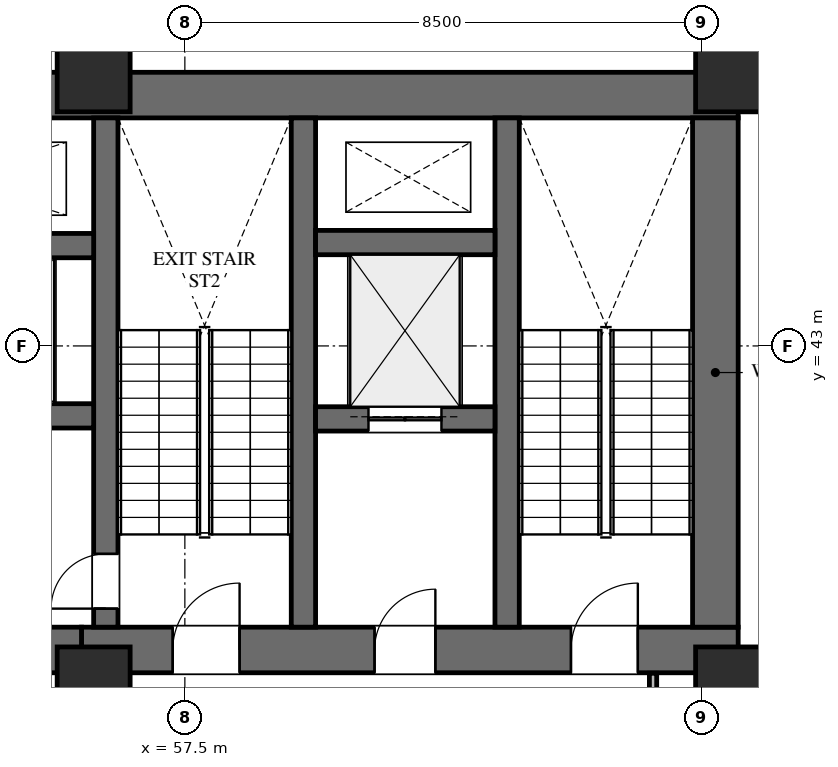
"""IFC4 building model, lengths in metres.
Left out: names, types, materials, properties, quantities, classifications, styles, units other than length and angle.
Written with IfcOpenShell. Run it as: python <this file> out.ifc"""

import sys

from ifc_helpers import new_model, si_unit, direction, frame, frame_2d, origin, origin_2d, place, context, subcontext, project, spatial, rectangle, extrude, element, fill, save


model = new_model("IFC4")
c1 = context("Model", 3, precision=1e-05, world=origin(), true_north=direction((0.0, 1.0)))
c2 = subcontext(c1, "Body", "Model", "MODEL_VIEW")
j1 = project(units=[si_unit("LENGTHUNIT", "METRE"), si_unit("PLANEANGLEUNIT", "RADIAN")], contexts=[c1])
p1 = place(None, origin())
s1 = spatial("IfcSite", under=j1, at=p1, CompositionType="ELEMENT")
p2 = place(p1, origin())
s2 = spatial("IfcBuilding", under=s1, at=p2, CompositionType="ELEMENT")
p3 = place(p2, frame((0.0, 0.0, 91.5)))
s3 = spatial("IfcBuildingStorey", under=s2, at=p3, CompositionType="ELEMENT", Elevation=91.5)
p4 = place(p3, frame((22.9, 47.125, 0.0), z_axis=(0.0, 0.0, 1.0), x_axis=(1.0, 0.0, 0.0)))
e1 = element("IfcWall", 1, at=p4, inside=s3, PredefinedType="SHEAR", context=c2, shape_type="SweptSolid", body=[
    extrude(rectangle(XDim=43.7, YDim=0.75, at=frame_2d((21.85, 0.0))), origin(), (0.0, 0.0, 1.0), 4.5),
])
p5 = place(p3, frame((55.8, 38.0, 0.0), z_axis=(0.0, 0.0, 1.0), x_axis=(1.0, 0.0, 0.0)))
e2 = element("IfcWall", 2, at=p5, inside=s3, PredefinedType="SHEAR", context=c2, shape_type="SweptSolid", body=[
    extrude(rectangle(XDim=10.8, YDim=0.75, at=frame_2d((5.4, 0.0))), origin(), (0.0, 0.0, 1.0), 4.5),
])
p6 = place(p5, frame((1.5, 0.0, 0.0)))
e3 = element("IfcOpeningElement", 3, at=p6, cuts=e2, PredefinedType="OPENING", context=c2, shape_type="SweptSolid", body=[
    extrude(rectangle(XDim=1.1, YDim=2.2, at=frame_2d((0.55, 1.1))), frame((0.0, 0.385, 0.0), z_axis=(0.0, -1.0, 0.0), x_axis=(1.0, 0.0, 0.0)), (0.0, 0.0, 1.0), 0.77),
])
p7 = place(p5, frame((4.82, 0.0, 0.0)))
e4 = element("IfcOpeningElement", 4, at=p7, cuts=e2, PredefinedType="OPENING", context=c2, shape_type="SweptSolid", body=[
    extrude(rectangle(XDim=1.0, YDim=2.15, at=frame_2d((0.5, 1.075))), frame((0.0, 0.385, 0.0), z_axis=(0.0, -1.0, 0.0), x_axis=(1.0, 0.0, 0.0)), (0.0, 0.0, 1.0), 0.77),
])
p8 = place(p5, frame((8.05, 0.0, 0.0)))
e5 = element("IfcOpeningElement", 5, at=p8, cuts=e2, PredefinedType="OPENING", context=c2, shape_type="SweptSolid", body=[
    extrude(rectangle(XDim=1.1, YDim=2.2, at=frame_2d((0.55, 1.1))), frame((0.0, 0.385, 0.0), z_axis=(0.0, -1.0, 0.0), x_axis=(1.0, 0.0, 0.0)), (0.0, 0.0, 1.0), 0.77),
])
p9 = place(p3, frame((66.225, 38.375, 0.0), z_axis=(0.0, 0.0, 1.0), x_axis=(0.0, 1.0, 0.0)))
e6 = element("IfcWall", 6, at=p9, inside=s3, PredefinedType="SHEAR", context=c2, shape_type="SweptSolid", body=[
    extrude(rectangle(XDim=8.375, YDim=0.75, at=frame_2d((4.188, 0.0))), origin(), (0.0, 0.0, 1.0), 4.5),
])
for number, where, z_axis, x_axis in (
    (7, (62.8, 38.375, 0.0), (0.0, 0.0, 1.0), (0.0, 1.0, 0.0)),
    (8, (59.45, 38.375, 0.0), (0.0, 0.0, 1.0), (0.0, 1.0, 0.0)),
):
    element("IfcWall", number, at=place(p3, frame(where, z_axis=z_axis, x_axis=x_axis)), inside=s3, PredefinedType="SHEAR", context=c2, shape_type="SweptSolid", body=[
        extrude(rectangle(XDim=8.375, YDim=0.4, at=frame_2d((4.188, 0.0))), origin(), (0.0, 0.0, 1.0), 4.5),
    ])
p10 = place(p3, frame((56.2, 38.375, 0.0), z_axis=(0.0, 0.0, 1.0), x_axis=(0.0, 1.0, 0.0)))
e9 = element("IfcWall", 9, at=p10, inside=s3, PredefinedType="SHEAR", context=c2, shape_type="SweptSolid", body=[
    extrude(rectangle(XDim=8.375, YDim=0.4, at=frame_2d((4.188, 0.0))), origin(), (0.0, 0.0, 1.0), 4.5),
])
p11 = place(p10, frame((0.305, 0.0, 0.0)))
e10 = element("IfcOpeningElement", 10, at=p11, cuts=e9, PredefinedType="OPENING", context=c2, shape_type="SweptSolid", body=[
    extrude(rectangle(XDim=0.9, YDim=2.15, at=frame_2d((0.45, 1.075))), frame((0.0, 0.21, 0.0), z_axis=(0.0, -1.0, 0.0), x_axis=(1.0, 0.0, 0.0)), (0.0, 0.0, 1.0), 0.42),
])
p12 = place(p3, frame((59.65, 41.8, 0.0), z_axis=(0.0, 0.0, 1.0), x_axis=(1.0, 0.0, 0.0)))
e11 = element("IfcWall", 11, at=p12, inside=s3, PredefinedType="SHEAR", context=c2, shape_type="SweptSolid", body=[
    extrude(rectangle(XDim=2.95, YDim=0.4, at=frame_2d((1.475, 0.0))), origin(), (0.0, 0.0, 1.0), 4.5),
])
p13 = place(p12, frame((0.87, 0.0, 0.0)))
e12 = element("IfcOpeningElement", 12, at=p13, cuts=e11, PredefinedType="OPENING", context=c2, shape_type="SweptSolid", body=[
    extrude(rectangle(XDim=1.2, YDim=2.2, at=frame_2d((0.6, 1.1))), frame((0.0, 0.21, 0.0), z_axis=(0.0, -1.0, 0.0), x_axis=(1.0, 0.0, 0.0)), (0.0, 0.0, 1.0), 0.42),
])
p14 = place(p3, frame((59.65, 44.7, 0.0), z_axis=(0.0, 0.0, 1.0), x_axis=(1.0, 0.0, 0.0)))
e13 = element("IfcWall", 13, at=p14, inside=s3, PredefinedType="SHEAR", context=c2, shape_type="SweptSolid", body=[
    extrude(rectangle(XDim=2.95, YDim=0.4, at=frame_2d((1.475, 0.0))), origin(), (0.0, 0.0, 1.0), 4.5),
])
p15 = place(p3, frame((50.8, 38.0, 0.0), z_axis=(0.0, 0.0, 1.0), x_axis=(1.0, 0.0, 0.0)))
e14 = element("IfcWall", 14, at=p15, inside=s3, PredefinedType="SHEAR", context=c2, shape_type="SweptSolid", body=[
    extrude(rectangle(XDim=5.0, YDim=0.75, at=frame_2d((2.5, 0.0))), origin(), (0.0, 0.0, 1.0), 4.5),
])
p16 = place(p15, frame((2.0, 0.0, 0.0)))
e15 = element("IfcOpeningElement", 15, at=p16, cuts=e14, PredefinedType="OPENING", context=c2, shape_type="SweptSolid", body=[
    extrude(rectangle(XDim=1.2, YDim=2.2, at=frame_2d((0.6, 1.1))), frame((0.0, 0.385, 0.0), z_axis=(0.0, -1.0, 0.0), x_axis=(1.0, 0.0, 0.0)), (0.0, 0.0, 1.0), 0.77),
])
p17 = place(p3, frame((51.25, 41.85, 0.0), z_axis=(0.0, 0.0, 1.0), x_axis=(1.0, 0.0, 0.0)))
e16 = element("IfcWall", 16, at=p17, inside=s3, PredefinedType="SHEAR", context=c2, shape_type="SweptSolid", body=[
    extrude(rectangle(XDim=4.75, YDim=0.4, at=frame_2d((2.375, 0.0))), origin(), (0.0, 0.0, 1.0), 4.5),
])
p18 = place(p17, frame((0.5, 0.0, 0.0)))
e17 = element("IfcOpeningElement", 17, at=p18, cuts=e16, PredefinedType="OPENING", context=c2, shape_type="SweptSolid", body=[
    extrude(rectangle(XDim=1.2, YDim=2.2, at=frame_2d((0.6, 1.1))), frame((0.0, 0.21, 0.0), z_axis=(0.0, -1.0, 0.0), x_axis=(1.0, 0.0, 0.0)), (0.0, 0.0, 1.0), 0.42),
])
p19 = place(p17, frame((2.6, 0.0, 0.0)))
e18 = element("IfcOpeningElement", 18, at=p19, cuts=e16, PredefinedType="OPENING", context=c2, shape_type="SweptSolid", body=[
    extrude(rectangle(XDim=1.2, YDim=2.2, at=frame_2d((0.6, 1.1))), frame((0.0, 0.21, 0.0), z_axis=(0.0, -1.0, 0.0), x_axis=(1.0, 0.0, 0.0)), (0.0, 0.0, 1.0), 0.42),
])
p20 = place(p3, frame((51.25, 44.65, 0.0), z_axis=(0.0, 0.0, 1.0), x_axis=(1.0, 0.0, 0.0)))
e19 = element("IfcWall", 19, at=p20, inside=s3, PredefinedType="SHEAR", context=c2, shape_type="SweptSolid", body=[
    extrude(rectangle(XDim=4.75, YDim=0.4, at=frame_2d((2.375, 0.0))), origin(), (0.0, 0.0, 1.0), 4.5),
])
for number, where, z_axis, x_axis in (
    (20, (66.5, 47.55, 0.0), (0.0, 0.0, 1.0), (1.0, 0.0, 0.0)),
    (21, (56.0, 47.55, 0.0), (0.0, 0.0, 1.0), (1.0, 0.0, 0.0)),
    (22, (66.5, 37.35, 0.0), (0.0, 0.0, 1.0), (1.0, 0.0, 0.0)),
    (23, (56.0, 37.35, 0.0), (0.0, 0.0, 1.0), (1.0, 0.0, 0.0)),
):
    element("IfcColumn", number, at=place(p3, frame(where, z_axis=z_axis, x_axis=x_axis)), inside=s3, PredefinedType="COLUMN", context=c2, shape_type="SweptSolid", body=[
        extrude(rectangle(XDim=1.2, YDim=1.4, at=origin_2d()), origin(), (0.0, 0.0, 1.0), 4.5),
    ])
p21 = place(p3, frame((65.2, 34.4, 0.0), z_axis=(0.0, 0.0, 1.0), x_axis=(0.0, 1.0, 0.0)))
e24 = element("IfcWall", 24, at=p21, inside=s3, PredefinedType="PARTITIONING", context=c2, shape_type="SweptSolid", body=[
    extrude(rectangle(XDim=3.217, YDim=0.12, at=frame_2d((1.608, 0.0))), origin(), (0.0, 0.0, 1.0), 3.323),
])
p22 = place(p6, origin())
e25 = element("IfcDoor", 25, at=p22, inside=s3, OperationType="SINGLE_SWING_RIGHT", PredefinedType="DOOR", context=c2, shape_type="SweptSolid", body=[
    extrude(rectangle(XDim=1.1, YDim=2.2, at=frame_2d((0.55, 1.1))), frame((0.0, 0.025, 0.0), z_axis=(0.0, -1.0, 0.0), x_axis=(1.0, 0.0, 0.0)), (0.0, 0.0, 1.0), 0.05),
])
fill(e3, e25)
p23 = place(p7, origin())
e26 = element("IfcDoor", 26, at=p23, inside=s3, OperationType="SINGLE_SWING_RIGHT", PredefinedType="DOOR", context=c2, shape_type="SweptSolid", body=[
    extrude(rectangle(XDim=1.0, YDim=2.15, at=frame_2d((0.5, 1.075))), frame((0.0, 0.025, 0.0), z_axis=(0.0, -1.0, 0.0), x_axis=(1.0, 0.0, 0.0)), (0.0, 0.0, 1.0), 0.05),
])
fill(e4, e26)
p24 = place(p8, origin())
e27 = element("IfcDoor", 27, at=p24, inside=s3, OperationType="SINGLE_SWING_RIGHT", PredefinedType="DOOR", context=c2, shape_type="SweptSolid", body=[
    extrude(rectangle(XDim=1.1, YDim=2.2, at=frame_2d((0.55, 1.1))), frame((0.0, 0.025, 0.0), z_axis=(0.0, -1.0, 0.0), x_axis=(1.0, 0.0, 0.0)), (0.0, 0.0, 1.0), 0.05),
])
fill(e5, e27)
p25 = place(p11, origin())
e28 = element("IfcDoor", 28, at=p25, inside=s3, OperationType="SINGLE_SWING_LEFT", PredefinedType="DOOR", context=c2, shape_type="SweptSolid", body=[
    extrude(rectangle(XDim=0.9, YDim=2.15, at=frame_2d((0.45, 1.075))), frame((0.0, 0.025, 0.0), z_axis=(0.0, -1.0, 0.0), x_axis=(1.0, 0.0, 0.0)), (0.0, 0.0, 1.0), 0.05),
])
fill(e10, e28)
p26 = place(p13, origin())
e29 = element("IfcDoor", 29, at=p26, inside=s3, OperationType="DOUBLE_DOOR_SLIDING", PredefinedType="DOOR", context=c2, shape_type="SweptSolid", body=[
    extrude(rectangle(XDim=1.2, YDim=2.2, at=frame_2d((0.6, 1.1))), frame((0.0, 0.025, 0.0), z_axis=(0.0, -1.0, 0.0), x_axis=(1.0, 0.0, 0.0)), (0.0, 0.0, 1.0), 0.05),
])
fill(e12, e29)
save(model, sys.argv[1])
